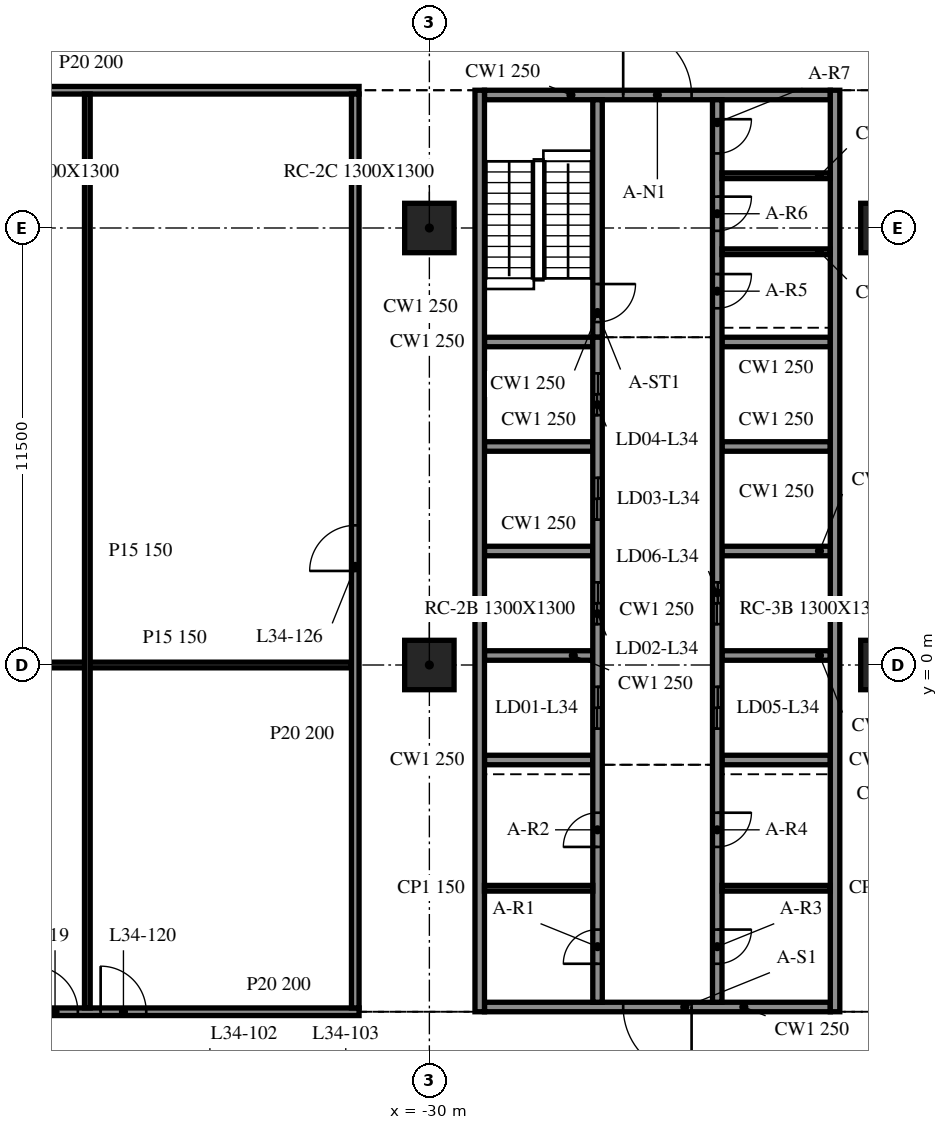
"""IFC4 building model, lengths in metres.
Left out: names, types, materials, properties, quantities, classifications, styles, units other than length and angle.
Written with IfcOpenShell. Run it as: python <this file> out.ifc"""

import sys

from ifc_helpers import new_model, si_unit, direction, frame, frame_2d, origin, origin_2d, place, context, subcontext, project, spatial, rectangle, extrude, element, fill, save


model = new_model("IFC4")
c1 = context("Model", 3, precision=1e-05, world=origin(), true_north=direction((0.0, 1.0)))
c2 = subcontext(c1, "Body", "Model", "MODEL_VIEW")
j1 = project(units=[si_unit("LENGTHUNIT", "METRE"), si_unit("PLANEANGLEUNIT", "RADIAN")], contexts=[c1])
p1 = place(None, origin())
s1 = spatial("IfcSite", under=j1, at=p1, CompositionType="ELEMENT")
p2 = place(p1, origin())
s2 = spatial("IfcBuilding", under=s1, at=p2, CompositionType="ELEMENT")
p3 = place(p2, frame((0.0, 0.0, 146.6)))
s3 = spatial("IfcBuildingStorey", under=s2, at=p3, CompositionType="ELEMENT", Elevation=146.6)
for number, where, z_axis, x_axis in (
    (1, (-30.0, 0.0, -0.34), (0.0, 0.0, 1.0), (1.0, 0.0, 0.0)),
    (2, (-30.0, 11.5, -0.34), (0.0, 0.0, 1.0), (1.0, 0.0, 0.0)),
    (3, (-18.0, 0.0, -0.34), (0.0, 0.0, 1.0), (1.0, 0.0, 0.0)),
    (4, (-18.0, 11.5, -0.34), (0.0, 0.0, 1.0), (1.0, 0.0, 0.0)),
):
    element("IfcColumn", number, at=place(p3, frame(where, z_axis=z_axis, x_axis=x_axis)), inside=s3, PredefinedType="COLUMN", context=c2, shape_type="SweptSolid", body=[
        extrude(rectangle(XDim=1.3, YDim=1.3, at=origin_2d()), origin(), (0.0, 0.0, 1.0), 4.1),
    ])
for number, where, z_axis, x_axis in (
    (5, (-28.675, 15.125, 0.0), (0.0, 0.0, 1.0), (0.0, -1.0, 0.0)),
    (6, (-19.325, -9.125, 0.0), (0.0, 0.0, 1.0), (0.0, 1.0, 0.0)),
):
    element("IfcWall", number, at=place(p3, frame(where, z_axis=z_axis, x_axis=x_axis)), inside=s3, PredefinedType="SOLIDWALL", context=c2, shape_type="SweptSolid", body=[
        extrude(rectangle(XDim=24.25, YDim=0.25, at=frame_2d((12.125, 0.0))), origin(), (0.0, 0.0, 1.0), 3.76),
    ])
p4 = place(p3, frame((-19.45, -9.0, 0.0), z_axis=(0.0, 0.0, 1.0), x_axis=(-1.0, 0.0, 0.0)))
e7 = element("IfcWall", 7, at=p4, inside=s3, PredefinedType="SOLIDWALL", context=c2, shape_type="SweptSolid", body=[
    extrude(rectangle(XDim=9.1, YDim=0.25, at=frame_2d((4.55, 0.0))), origin(), (0.0, 0.0, 1.0), 3.76),
])
p5 = place(p4, frame((3.65, 0.0, 0.0)))
e8 = element("IfcOpeningElement", 8, at=p5, cuts=e7, PredefinedType="OPENING", context=c2, shape_type="SweptSolid", body=[
    extrude(rectangle(XDim=1.8, YDim=2.1, at=frame_2d((0.9, 1.05))), frame((0.0, 0.135, 0.0), z_axis=(0.0, -1.0, 0.0), x_axis=(1.0, 0.0, 0.0)), (0.0, 0.0, 1.0), 0.27),
])
p6 = place(p3, frame((-28.55, 15.0, 0.0), z_axis=(0.0, 0.0, 1.0), x_axis=(1.0, 0.0, 0.0)))
e9 = element("IfcWall", 9, at=p6, inside=s3, PredefinedType="SOLIDWALL", context=c2, shape_type="SweptSolid", body=[
    extrude(rectangle(XDim=9.1, YDim=0.25, at=frame_2d((4.55, 0.0))), origin(), (0.0, 0.0, 1.0), 3.76),
])
p7 = place(p6, frame((3.65, 0.0, 0.0)))
e10 = element("IfcOpeningElement", 10, at=p7, cuts=e9, PredefinedType="OPENING", context=c2, shape_type="SweptSolid", body=[
    extrude(rectangle(XDim=1.8, YDim=2.1, at=frame_2d((0.9, 1.05))), frame((0.0, 0.135, 0.0), z_axis=(0.0, -1.0, 0.0), x_axis=(1.0, 0.0, 0.0)), (0.0, 0.0, 1.0), 0.27),
])
p8 = place(p3, frame((-25.575, -8.875, 0.0), z_axis=(0.0, 0.0, 1.0), x_axis=(0.0, 1.0, 0.0)))
e11 = element("IfcWall", 11, at=p8, inside=s3, PredefinedType="SOLIDWALL", context=c2, shape_type="SweptSolid", body=[
    extrude(rectangle(XDim=17.5, YDim=0.25, at=frame_2d((8.75, 0.0))), origin(), (0.0, 0.0, 1.0), 3.76),
])
p9 = place(p8, frame((7.2, 0.0, 0.0)))
e12 = element("IfcOpeningElement", 12, at=p9, cuts=e11, PredefinedType="OPENING", context=c2, shape_type="SweptSolid", body=[
    extrude(rectangle(XDim=1.1, YDim=2.1, at=frame_2d((0.55, 1.05))), frame((0.0, 0.135, 0.0), z_axis=(0.0, -1.0, 0.0), x_axis=(1.0, 0.0, 0.0)), (0.0, 0.0, 1.0), 0.27),
])
p10 = place(p8, frame((9.95, 0.0, 0.0)))
e13 = element("IfcOpeningElement", 13, at=p10, cuts=e11, PredefinedType="OPENING", context=c2, shape_type="SweptSolid", body=[
    extrude(rectangle(XDim=1.1, YDim=2.1, at=frame_2d((0.55, 1.05))), frame((0.0, 0.135, 0.0), z_axis=(0.0, -1.0, 0.0), x_axis=(1.0, 0.0, 0.0)), (0.0, 0.0, 1.0), 0.27),
])
p11 = place(p8, frame((12.7, 0.0, 0.0)))
e14 = element("IfcOpeningElement", 14, at=p11, cuts=e11, PredefinedType="OPENING", context=c2, shape_type="SweptSolid", body=[
    extrude(rectangle(XDim=1.1, YDim=2.1, at=frame_2d((0.55, 1.05))), frame((0.0, 0.135, 0.0), z_axis=(0.0, -1.0, 0.0), x_axis=(1.0, 0.0, 0.0)), (0.0, 0.0, 1.0), 0.27),
])
p12 = place(p8, frame((15.45, 0.0, 0.0)))
e15 = element("IfcOpeningElement", 15, at=p12, cuts=e11, PredefinedType="OPENING", context=c2, shape_type="SweptSolid", body=[
    extrude(rectangle(XDim=1.1, YDim=2.1, at=frame_2d((0.55, 1.05))), frame((0.0, 0.135, 0.0), z_axis=(0.0, -1.0, 0.0), x_axis=(1.0, 0.0, 0.0)), (0.0, 0.0, 1.0), 0.27),
])
p13 = place(p8, frame((1.012, 0.0, 0.0)))
e16 = element("IfcOpeningElement", 16, at=p13, cuts=e11, PredefinedType="OPENING", context=c2, shape_type="SweptSolid", body=[
    extrude(rectangle(XDim=0.9, YDim=2.1, at=frame_2d((0.45, 1.05))), frame((0.0, 0.135, 0.0), z_axis=(0.0, -1.0, 0.0), x_axis=(1.0, 0.0, 0.0)), (0.0, 0.0, 1.0), 0.27),
])
p14 = place(p8, frame((4.087, 0.0, 0.0)))
e17 = element("IfcOpeningElement", 17, at=p14, cuts=e11, PredefinedType="OPENING", context=c2, shape_type="SweptSolid", body=[
    extrude(rectangle(XDim=0.9, YDim=2.1, at=frame_2d((0.45, 1.05))), frame((0.0, 0.135, 0.0), z_axis=(0.0, -1.0, 0.0), x_axis=(1.0, 0.0, 0.0)), (0.0, 0.0, 1.0), 0.27),
])
p15 = place(p3, frame((-25.575, 14.875, 0.0), z_axis=(0.0, 0.0, 1.0), x_axis=(0.0, -1.0, 0.0)))
e18 = element("IfcWall", 18, at=p15, inside=s3, PredefinedType="SOLIDWALL", context=c2, shape_type="SweptSolid", body=[
    extrude(rectangle(XDim=6.25, YDim=0.25, at=frame_2d((3.125, 0.0))), origin(), (0.0, 0.0, 1.0), 3.76),
])
p16 = place(p15, frame((4.85, 0.0, 0.0)))
e19 = element("IfcOpeningElement", 19, at=p16, cuts=e18, PredefinedType="OPENING", context=c2, shape_type="SweptSolid", body=[
    extrude(rectangle(XDim=1.0, YDim=2.1, at=frame_2d((0.5, 1.05))), frame((0.0, 0.135, 0.0), z_axis=(0.0, -1.0, 0.0), x_axis=(1.0, 0.0, 0.0)), (0.0, 0.0, 1.0), 0.27),
])
p17 = place(p3, frame((-22.425, 14.875, 0.0), z_axis=(0.0, 0.0, 1.0), x_axis=(0.0, -1.0, 0.0)))
e20 = element("IfcWall", 20, at=p17, inside=s3, PredefinedType="SOLIDWALL", context=c2, shape_type="SweptSolid", body=[
    extrude(rectangle(XDim=23.75, YDim=0.25, at=frame_2d((11.875, 0.0))), origin(), (0.0, 0.0, 1.0), 3.76),
])
p18 = place(p17, frame((15.45, 0.0, 0.0)))
e21 = element("IfcOpeningElement", 21, at=p18, cuts=e20, PredefinedType="OPENING", context=c2, shape_type="SweptSolid", body=[
    extrude(rectangle(XDim=1.1, YDim=2.1, at=frame_2d((0.55, 1.05))), frame((0.0, 0.135, 0.0), z_axis=(0.0, -1.0, 0.0), x_axis=(1.0, 0.0, 0.0)), (0.0, 0.0, 1.0), 0.27),
])
p19 = place(p17, frame((12.7, 0.0, 0.0)))
e22 = element("IfcOpeningElement", 22, at=p19, cuts=e20, PredefinedType="OPENING", context=c2, shape_type="SweptSolid", body=[
    extrude(rectangle(XDim=1.1, YDim=2.1, at=frame_2d((0.55, 1.05))), frame((0.0, 0.135, 0.0), z_axis=(0.0, -1.0, 0.0), x_axis=(1.0, 0.0, 0.0)), (0.0, 0.0, 1.0), 0.27),
])
p20 = place(p17, frame((21.837, 0.0, 0.0)))
e23 = element("IfcOpeningElement", 23, at=p20, cuts=e20, PredefinedType="OPENING", context=c2, shape_type="SweptSolid", body=[
    extrude(rectangle(XDim=0.9, YDim=2.1, at=frame_2d((0.45, 1.05))), frame((0.0, 0.135, 0.0), z_axis=(0.0, -1.0, 0.0), x_axis=(1.0, 0.0, 0.0)), (0.0, 0.0, 1.0), 0.27),
])
p21 = place(p17, frame((18.762, 0.0, 0.0)))
e24 = element("IfcOpeningElement", 24, at=p21, cuts=e20, PredefinedType="OPENING", context=c2, shape_type="SweptSolid", body=[
    extrude(rectangle(XDim=0.9, YDim=2.1, at=frame_2d((0.45, 1.05))), frame((0.0, 0.135, 0.0), z_axis=(0.0, -1.0, 0.0), x_axis=(1.0, 0.0, 0.0)), (0.0, 0.0, 1.0), 0.27),
])
p22 = place(p17, frame((4.587, 0.0, 0.0)))
e25 = element("IfcOpeningElement", 25, at=p22, cuts=e20, PredefinedType="OPENING", context=c2, shape_type="SweptSolid", body=[
    extrude(rectangle(XDim=0.9, YDim=2.1, at=frame_2d((0.45, 1.05))), frame((0.0, 0.135, 0.0), z_axis=(0.0, -1.0, 0.0), x_axis=(1.0, 0.0, 0.0)), (0.0, 0.0, 1.0), 0.27),
])
p23 = place(p17, frame((2.55, 0.0, 0.0)))
e26 = element("IfcOpeningElement", 26, at=p23, cuts=e20, PredefinedType="OPENING", context=c2, shape_type="SweptSolid", body=[
    extrude(rectangle(XDim=0.9, YDim=2.1, at=frame_2d((0.45, 1.05))), frame((0.0, 0.135, 0.0), z_axis=(0.0, -1.0, 0.0), x_axis=(1.0, 0.0, 0.0)), (0.0, 0.0, 1.0), 0.27),
])
p24 = place(p17, frame((0.512, 0.0, 0.0)))
e27 = element("IfcOpeningElement", 27, at=p24, cuts=e20, PredefinedType="OPENING", context=c2, shape_type="SweptSolid", body=[
    extrude(rectangle(XDim=0.9, YDim=2.1, at=frame_2d((0.45, 1.05))), frame((0.0, 0.135, 0.0), z_axis=(0.0, -1.0, 0.0), x_axis=(1.0, 0.0, 0.0)), (0.0, 0.0, 1.0), 0.27),
])
for number, where, z_axis, x_axis in (
    (28, (-28.55, -2.5, 0.0), (0.0, 0.0, 1.0), (1.0, 0.0, 0.0)),
    (29, (-28.55, 0.25, 0.0), (0.0, 0.0, 1.0), (1.0, 0.0, 0.0)),
    (30, (-28.55, 3.0, 0.0), (0.0, 0.0, 1.0), (1.0, 0.0, 0.0)),
    (31, (-28.55, 5.75, 0.0), (0.0, 0.0, 1.0), (1.0, 0.0, 0.0)),
    (32, (-28.55, 8.5, 0.0), (0.0, 0.0, 1.0), (1.0, 0.0, 0.0)),
    (33, (-22.3, -2.5, 0.0), (0.0, 0.0, 1.0), (1.0, 0.0, 0.0)),
    (34, (-22.3, 0.25, 0.0), (0.0, 0.0, 1.0), (1.0, 0.0, 0.0)),
    (35, (-22.3, 3.0, 0.0), (0.0, 0.0, 1.0), (1.0, 0.0, 0.0)),
    (36, (-22.3, 5.75, 0.0), (0.0, 0.0, 1.0), (1.0, 0.0, 0.0)),
    (37, (-22.3, 8.5, 0.0), (0.0, 0.0, 1.0), (1.0, 0.0, 0.0)),
):
    element("IfcWall", number, at=place(p3, frame(where, z_axis=z_axis, x_axis=x_axis)), inside=s3, PredefinedType="SOLIDWALL", context=c2, shape_type="SweptSolid", body=[
        extrude(rectangle(XDim=2.85, YDim=0.25, at=frame_2d((1.425, 0.0))), origin(), (0.0, 0.0, 1.0), 3.76),
    ])
for number, where, z_axis, x_axis in (
    (38, (-28.55, -5.875, 0.0), (0.0, 0.0, 1.0), (1.0, 0.0, 0.0)),
    (39, (-22.3, -5.875, 0.0), (0.0, 0.0, 1.0), (1.0, 0.0, 0.0)),
    (40, (-22.3, 10.875, 0.0), (0.0, 0.0, 1.0), (1.0, 0.0, 0.0)),
    (41, (-22.3, 12.875, 0.0), (0.0, 0.0, 1.0), (1.0, 0.0, 0.0)),
):
    element("IfcWall", number, at=place(p3, frame(where, z_axis=z_axis, x_axis=x_axis)), inside=s3, PredefinedType="PARTITIONING", context=c2, shape_type="SweptSolid", body=[
        extrude(rectangle(XDim=2.85, YDim=0.15, at=frame_2d((1.425, 0.0))), origin(), (0.0, 0.0, 1.0), 3.76),
    ])
p25 = place(p3, frame((-45.95, -9.125, 0.0), z_axis=(0.0, 0.0, 1.0), x_axis=(1.0, 0.0, 0.0)))
e42 = element("IfcWall", 42, at=p25, inside=s3, PredefinedType="PARTITIONING", context=c2, shape_type="SweptSolid", body=[
    extrude(rectangle(XDim=14.1, YDim=0.2, at=frame_2d((7.05, 0.0))), origin(), (0.0, 0.0, 1.0), 3.76),
])
p26 = place(p25, frame((5.5, 0.0, 0.0)))
e43 = element("IfcOpeningElement", 43, at=p26, cuts=e42, PredefinedType="OPENING", context=c2, shape_type="SweptSolid", body=[
    extrude(rectangle(XDim=1.2, YDim=2.1, at=frame_2d((0.6, 1.05))), frame((0.0, 0.11, 0.0), z_axis=(0.0, -1.0, 0.0), x_axis=(1.0, 0.0, 0.0)), (0.0, 0.0, 1.0), 0.22),
])
p27 = place(p25, frame((7.3, 0.0, 0.0)))
e44 = element("IfcOpeningElement", 44, at=p27, cuts=e42, PredefinedType="OPENING", context=c2, shape_type="SweptSolid", body=[
    extrude(rectangle(XDim=1.2, YDim=2.1, at=frame_2d((0.6, 1.05))), frame((0.0, 0.11, 0.0), z_axis=(0.0, -1.0, 0.0), x_axis=(1.0, 0.0, 0.0)), (0.0, 0.0, 1.0), 0.22),
])
p28 = place(p3, frame((-41.35, 0.0, 0.0), z_axis=(0.0, 0.0, 1.0), x_axis=(1.0, 0.0, 0.0)))
e45 = element("IfcWall", 45, at=p28, inside=s3, PredefinedType="PARTITIONING", context=c2, shape_type="SweptSolid", body=[
    extrude(rectangle(XDim=9.3, YDim=0.15, at=frame_2d((4.65, 0.0))), origin(), (0.0, 0.0, 1.0), 3.76),
])
p29 = place(p3, frame((-45.95, 15.125, 0.0), z_axis=(0.0, 0.0, 1.0), x_axis=(1.0, 0.0, 0.0)))
e46 = element("IfcWall", 46, at=p29, inside=s3, PredefinedType="PARTITIONING", context=c2, shape_type="SweptSolid", body=[
    extrude(rectangle(XDim=14.1, YDim=0.2, at=frame_2d((7.05, 0.0))), origin(), (0.0, 0.0, 1.0), 3.76),
])
p30 = place(p3, frame((-39.0, -9.025, 0.0), z_axis=(0.0, 0.0, 1.0), x_axis=(0.0, 1.0, 0.0)))
e47 = element("IfcWall", 47, at=p30, inside=s3, PredefinedType="PARTITIONING", context=c2, shape_type="SweptSolid", body=[
    extrude(rectangle(XDim=24.05, YDim=0.15, at=frame_2d((12.025, 0.0))), origin(), (0.0, 0.0, 1.0), 3.76),
])
p31 = place(p3, frame((-31.95, -9.025, 0.0), z_axis=(0.0, 0.0, 1.0), x_axis=(0.0, 1.0, 0.0)))
e48 = element("IfcWall", 48, at=p31, inside=s3, PredefinedType="PARTITIONING", context=c2, shape_type="SweptSolid", body=[
    extrude(rectangle(XDim=24.05, YDim=0.2, at=frame_2d((12.025, 0.0))), origin(), (0.0, 0.0, 1.0), 3.76),
])
p32 = place(p31, frame((11.5, 0.0, 0.0)))
e49 = element("IfcOpeningElement", 49, at=p32, cuts=e48, PredefinedType="OPENING", context=c2, shape_type="SweptSolid", body=[
    extrude(rectangle(XDim=1.2, YDim=2.1, at=frame_2d((0.6, 1.05))), frame((0.0, 0.11, 0.0), z_axis=(0.0, -1.0, 0.0), x_axis=(1.0, 0.0, 0.0)), (0.0, 0.0, 1.0), 0.22),
])
p33 = place(p5, origin())
e50 = element("IfcDoor", 50, at=p33, inside=s3, OperationType="DOUBLE_DOOR_SINGLE_SWING", PredefinedType="DOOR", context=c2, shape_type="SweptSolid", body=[
    extrude(rectangle(XDim=1.8, YDim=2.1, at=frame_2d((0.9, 1.05))), frame((0.0, 0.025, 0.0), z_axis=(0.0, -1.0, 0.0), x_axis=(1.0, 0.0, 0.0)), (0.0, 0.0, 1.0), 0.05),
])
fill(e8, e50)
p34 = place(p7, origin())
e51 = element("IfcDoor", 51, at=p34, inside=s3, OperationType="DOUBLE_DOOR_SINGLE_SWING", PredefinedType="DOOR", context=c2, shape_type="SweptSolid", body=[
    extrude(rectangle(XDim=1.8, YDim=2.1, at=frame_2d((0.9, 1.05))), frame((0.0, 0.025, 0.0), z_axis=(0.0, -1.0, 0.0), x_axis=(1.0, 0.0, 0.0)), (0.0, 0.0, 1.0), 0.05),
])
fill(e10, e51)
p35 = place(p18, origin())
e52 = element("IfcDoor", 52, at=p35, inside=s3, OperationType="DOUBLE_DOOR_SLIDING", PredefinedType="DOOR", context=c2, shape_type="SweptSolid", body=[
    extrude(rectangle(XDim=1.1, YDim=2.1, at=frame_2d((0.55, 1.05))), frame((0.0, 0.025, 0.0), z_axis=(0.0, -1.0, 0.0), x_axis=(1.0, 0.0, 0.0)), (0.0, 0.0, 1.0), 0.05),
])
fill(e21, e52)
p36 = place(p19, origin())
e53 = element("IfcDoor", 53, at=p36, inside=s3, OperationType="DOUBLE_DOOR_SLIDING", PredefinedType="DOOR", context=c2, shape_type="SweptSolid", body=[
    extrude(rectangle(XDim=1.1, YDim=2.1, at=frame_2d((0.55, 1.05))), frame((0.0, 0.025, 0.0), z_axis=(0.0, -1.0, 0.0), x_axis=(1.0, 0.0, 0.0)), (0.0, 0.0, 1.0), 0.05),
])
fill(e22, e53)
p37 = place(p9, origin())
e54 = element("IfcDoor", 54, at=p37, inside=s3, OperationType="DOUBLE_DOOR_SLIDING", PredefinedType="DOOR", context=c2, shape_type="SweptSolid", body=[
    extrude(rectangle(XDim=1.1, YDim=2.1, at=frame_2d((0.55, 1.05))), frame((0.0, 0.025, 0.0), z_axis=(0.0, -1.0, 0.0), x_axis=(1.0, 0.0, 0.0)), (0.0, 0.0, 1.0), 0.05),
])
fill(e12, e54)
p38 = place(p10, origin())
e55 = element("IfcDoor", 55, at=p38, inside=s3, OperationType="DOUBLE_DOOR_SLIDING", PredefinedType="DOOR", context=c2, shape_type="SweptSolid", body=[
    extrude(rectangle(XDim=1.1, YDim=2.1, at=frame_2d((0.55, 1.05))), frame((0.0, 0.025, 0.0), z_axis=(0.0, -1.0, 0.0), x_axis=(1.0, 0.0, 0.0)), (0.0, 0.0, 1.0), 0.05),
])
fill(e13, e55)
p39 = place(p11, origin())
e56 = element("IfcDoor", 56, at=p39, inside=s3, OperationType="DOUBLE_DOOR_SLIDING", PredefinedType="DOOR", context=c2, shape_type="SweptSolid", body=[
    extrude(rectangle(XDim=1.1, YDim=2.1, at=frame_2d((0.55, 1.05))), frame((0.0, 0.025, 0.0), z_axis=(0.0, -1.0, 0.0), x_axis=(1.0, 0.0, 0.0)), (0.0, 0.0, 1.0), 0.05),
])
fill(e14, e56)
p40 = place(p12, origin())
e57 = element("IfcDoor", 57, at=p40, inside=s3, OperationType="DOUBLE_DOOR_SLIDING", PredefinedType="DOOR", context=c2, shape_type="SweptSolid", body=[
    extrude(rectangle(XDim=1.1, YDim=2.1, at=frame_2d((0.55, 1.05))), frame((0.0, 0.025, 0.0), z_axis=(0.0, -1.0, 0.0), x_axis=(1.0, 0.0, 0.0)), (0.0, 0.0, 1.0), 0.05),
])
fill(e15, e57)
p41 = place(p13, origin())
e58 = element("IfcDoor", 58, at=p41, inside=s3, OperationType="SINGLE_SWING_LEFT", PredefinedType="DOOR", context=c2, shape_type="SweptSolid", body=[
    extrude(rectangle(XDim=0.9, YDim=2.1, at=frame_2d((0.45, 1.05))), frame((0.0, 0.025, 0.0), z_axis=(0.0, -1.0, 0.0), x_axis=(1.0, 0.0, 0.0)), (0.0, 0.0, 1.0), 0.05),
])
fill(e16, e58)
p42 = place(p14, origin())
e59 = element("IfcDoor", 59, at=p42, inside=s3, OperationType="SINGLE_SWING_RIGHT", PredefinedType="DOOR", context=c2, shape_type="SweptSolid", body=[
    extrude(rectangle(XDim=0.9, YDim=2.1, at=frame_2d((0.45, 1.05))), frame((0.0, 0.025, 0.0), z_axis=(0.0, -1.0, 0.0), x_axis=(1.0, 0.0, 0.0)), (0.0, 0.0, 1.0), 0.05),
])
fill(e17, e59)
p43 = place(p20, origin())
e60 = element("IfcDoor", 60, at=p43, inside=s3, OperationType="SINGLE_SWING_LEFT", PredefinedType="DOOR", context=c2, shape_type="SweptSolid", body=[
    extrude(rectangle(XDim=0.9, YDim=2.1, at=frame_2d((0.45, 1.05))), frame((0.0, 0.025, 0.0), z_axis=(0.0, -1.0, 0.0), x_axis=(1.0, 0.0, 0.0)), (0.0, 0.0, 1.0), 0.05),
])
fill(e23, e60)
p44 = place(p21, origin())
e61 = element("IfcDoor", 61, at=p44, inside=s3, OperationType="SINGLE_SWING_RIGHT", PredefinedType="DOOR", context=c2, shape_type="SweptSolid", body=[
    extrude(rectangle(XDim=0.9, YDim=2.1, at=frame_2d((0.45, 1.05))), frame((0.0, 0.025, 0.0), z_axis=(0.0, -1.0, 0.0), x_axis=(1.0, 0.0, 0.0)), (0.0, 0.0, 1.0), 0.05),
])
fill(e24, e61)
p45 = place(p22, origin())
e62 = element("IfcDoor", 62, at=p45, inside=s3, OperationType="SINGLE_SWING_LEFT", PredefinedType="DOOR", context=c2, shape_type="SweptSolid", body=[
    extrude(rectangle(XDim=0.9, YDim=2.1, at=frame_2d((0.45, 1.05))), frame((0.0, 0.025, 0.0), z_axis=(0.0, -1.0, 0.0), x_axis=(1.0, 0.0, 0.0)), (0.0, 0.0, 1.0), 0.05),
])
fill(e25, e62)
p46 = place(p23, origin())
e63 = element("IfcDoor", 63, at=p46, inside=s3, OperationType="SINGLE_SWING_RIGHT", PredefinedType="DOOR", context=c2, shape_type="SweptSolid", body=[
    extrude(rectangle(XDim=0.9, YDim=2.1, at=frame_2d((0.45, 1.05))), frame((0.0, 0.025, 0.0), z_axis=(0.0, -1.0, 0.0), x_axis=(1.0, 0.0, 0.0)), (0.0, 0.0, 1.0), 0.05),
])
fill(e26, e63)
p47 = place(p24, origin())
e64 = element("IfcDoor", 64, at=p47, inside=s3, OperationType="SINGLE_SWING_LEFT", PredefinedType="DOOR", context=c2, shape_type="SweptSolid", body=[
    extrude(rectangle(XDim=0.9, YDim=2.1, at=frame_2d((0.45, 1.05))), frame((0.0, 0.025, 0.0), z_axis=(0.0, -1.0, 0.0), x_axis=(1.0, 0.0, 0.0)), (0.0, 0.0, 1.0), 0.05),
])
fill(e27, e64)
p48 = place(p16, origin())
e65 = element("IfcDoor", 65, at=p48, inside=s3, OperationType="SINGLE_SWING_RIGHT", PredefinedType="DOOR", context=c2, shape_type="SweptSolid", body=[
    extrude(rectangle(XDim=1.0, YDim=2.1, at=frame_2d((0.5, 1.05))), frame((0.0, 0.025, 0.0), z_axis=(0.0, -1.0, 0.0), x_axis=(1.0, 0.0, 0.0)), (0.0, 0.0, 1.0), 0.05),
])
fill(e19, e65)
p49 = place(p26, origin())
e66 = element("IfcDoor", 66, at=p49, inside=s3, OperationType="SINGLE_SWING_LEFT", PredefinedType="DOOR", context=c2, shape_type="SweptSolid", body=[
    extrude(rectangle(XDim=1.2, YDim=2.1, at=frame_2d((0.6, 1.05))), frame((0.0, 0.025, 0.0), z_axis=(0.0, -1.0, 0.0), x_axis=(1.0, 0.0, 0.0)), (0.0, 0.0, 1.0), 0.05),
])
fill(e43, e66)
p50 = place(p27, origin())
e67 = element("IfcDoor", 67, at=p50, inside=s3, OperationType="SINGLE_SWING_RIGHT", PredefinedType="DOOR", context=c2, shape_type="SweptSolid", body=[
    extrude(rectangle(XDim=1.2, YDim=2.1, at=frame_2d((0.6, 1.05))), frame((0.0, 0.025, 0.0), z_axis=(0.0, -1.0, 0.0), x_axis=(1.0, 0.0, 0.0)), (0.0, 0.0, 1.0), 0.05),
])
fill(e44, e67)
p51 = place(p32, origin())
e68 = element("IfcDoor", 68, at=p51, inside=s3, OperationType="SINGLE_SWING_RIGHT", PredefinedType="DOOR", context=c2, shape_type="SweptSolid", body=[
    extrude(rectangle(XDim=1.2, YDim=2.1, at=frame_2d((0.6, 1.05))), frame((0.0, 0.025, 0.0), z_axis=(0.0, -1.0, 0.0), x_axis=(1.0, 0.0, 0.0)), (0.0, 0.0, 1.0), 0.05),
])
fill(e49, e68)
save(model, sys.argv[1])
